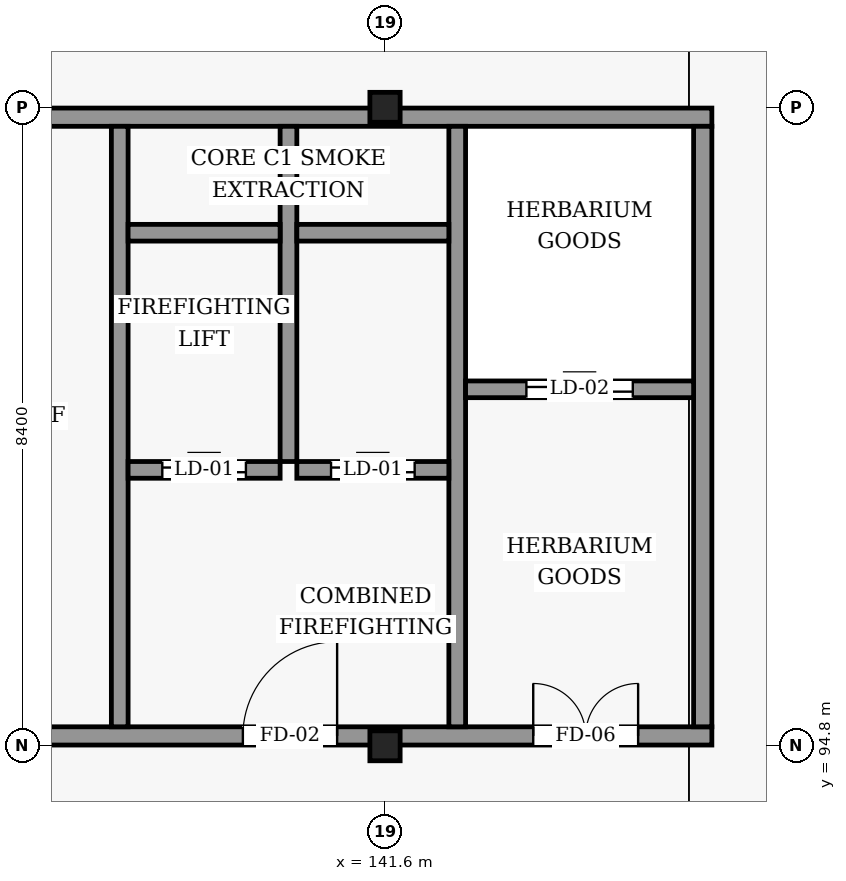
"""IFC4 building model, lengths in metres.
Left out: names, types, materials, properties, quantities, classifications, styles, units other than length and angle.
Written with IfcOpenShell. Run it as: python <this file> out.ifc"""

import sys

from ifc_helpers import new_model, si_unit, direction, frame, frame_2d, origin, origin_2d, place, context, subcontext, project, spatial, rectangle, i_section, extrude, element, fill, save


model = new_model("IFC4")
c1 = context("Model", 3, precision=1e-05, world=origin(), true_north=direction((0.0, 1.0)))
c2 = subcontext(c1, "Body", "Model", "MODEL_VIEW")
j1 = project(units=[si_unit("LENGTHUNIT", "METRE"), si_unit("PLANEANGLEUNIT", "RADIAN")], contexts=[c1])
p1 = place(None, origin())
s1 = spatial("IfcSite", under=j1, at=p1, CompositionType="ELEMENT")
p2 = place(p1, origin())
s2 = spatial("IfcBuilding", under=s1, at=p2, CompositionType="ELEMENT")
p3 = place(p2, frame((0.0, 0.0, 24.6)))
s3 = spatial("IfcBuildingStorey", under=s2, at=p3, CompositionType="ELEMENT", Elevation=24.6)
for number, where, z_axis, x_axis in (
    (1, (141.6, 94.8, 0.0), (0.0, 0.0, 1.0), (1.0, 0.0, 0.0)),
    (2, (141.6, 103.2, 0.0), (0.0, 0.0, 1.0), (1.0, 0.0, 0.0)),
):
    element("IfcColumn", number, at=place(p3, frame(where, z_axis=z_axis, x_axis=x_axis)), inside=s3, PredefinedType="COLUMN", context=c2, shape_type="SweptSolid", body=[
        extrude(i_section(OverallWidth=0.398, OverallDepth=0.394, WebThickness=0.011, FlangeThickness=0.018, FilletRadius=0.022, at=origin_2d()), origin(), (0.0, 0.0, 1.0), 3.6),
    ])
p4 = place(p3, frame((134.25, 94.93, 0.0), z_axis=(0.0, 0.0, 1.0), x_axis=(1.0, 0.0, 0.0)))
e3 = element("IfcWall", 3, at=p4, inside=s3, PredefinedType="SHEAR", context=c2, shape_type="SweptSolid", body=[
    extrude(rectangle(XDim=11.65, YDim=0.24, at=frame_2d((5.825, 0.0))), origin(), (0.0, 0.0, 1.0), 3.345),
])
p5 = place(p4, frame((1.5, 0.0, 0.0)))
e4 = element("IfcOpeningElement", 4, at=p5, cuts=e3, PredefinedType="OPENING", context=c2, shape_type="SweptSolid", body=[
    extrude(rectangle(XDim=1.22, YDim=2.18, at=frame_2d((0.61, 1.09))), frame((0.0, 0.13, 0.0), z_axis=(0.0, -1.0, 0.0), x_axis=(1.0, 0.0, 0.0)), (0.0, 0.0, 1.0), 0.26),
])
p6 = place(p4, frame((5.48, 0.0, 0.0)))
e5 = element("IfcOpeningElement", 5, at=p6, cuts=e3, PredefinedType="OPENING", context=c2, shape_type="SweptSolid", body=[
    extrude(rectangle(XDim=1.24, YDim=2.15, at=frame_2d((0.62, 1.075))), frame((0.0, 0.13, 0.0), z_axis=(0.0, -1.0, 0.0), x_axis=(1.0, 0.0, 0.0)), (0.0, 0.0, 1.0), 0.26),
])
p7 = place(p4, frame((9.3, 0.0, 0.0)))
e6 = element("IfcOpeningElement", 6, at=p7, cuts=e3, PredefinedType="OPENING", context=c2, shape_type="SweptSolid", body=[
    extrude(rectangle(XDim=1.38, YDim=2.15, at=frame_2d((0.69, 1.075))), frame((0.0, 0.13, 0.0), z_axis=(0.0, -1.0, 0.0), x_axis=(1.0, 0.0, 0.0)), (0.0, 0.0, 1.0), 0.26),
])
p8 = place(p3, frame((134.25, 103.07, 0.0), z_axis=(0.0, 0.0, 1.0), x_axis=(1.0, 0.0, 0.0)))
e7 = element("IfcWall", 7, at=p8, inside=s3, PredefinedType="SHEAR", context=c2, shape_type="SweptSolid", body=[
    extrude(rectangle(XDim=11.65, YDim=0.24, at=frame_2d((5.825, 0.0))), origin(), (0.0, 0.0, 1.0), 3.345),
])
p9 = place(p3, frame((138.11, 95.05, 0.0), z_axis=(0.0, 0.0, 1.0), x_axis=(0.0, 1.0, 0.0)))
e8 = element("IfcWall", 8, at=p9, inside=s3, PredefinedType="SHEAR", context=c2, shape_type="SweptSolid", body=[
    extrude(rectangle(XDim=7.9, YDim=0.22, at=frame_2d((3.95, 0.0))), origin(), (0.0, 0.0, 1.0), 3.345),
])
p10 = place(p3, frame((140.33, 98.54, 0.0), z_axis=(0.0, 0.0, 1.0), x_axis=(0.0, 1.0, 0.0)))
e9 = element("IfcWall", 9, at=p10, inside=s3, PredefinedType="SHEAR", context=c2, shape_type="SweptSolid", body=[
    extrude(rectangle(XDim=4.41, YDim=0.22, at=frame_2d((2.205, 0.0))), origin(), (0.0, 0.0, 1.0), 3.345),
])
p11 = place(p3, frame((142.55, 95.05, 0.0), z_axis=(0.0, 0.0, 1.0), x_axis=(0.0, 1.0, 0.0)))
e10 = element("IfcWall", 10, at=p11, inside=s3, PredefinedType="SHEAR", context=c2, shape_type="SweptSolid", body=[
    extrude(rectangle(XDim=7.9, YDim=0.22, at=frame_2d((3.95, 0.0))), origin(), (0.0, 0.0, 1.0), 3.345),
])
p12 = place(p3, frame((145.78, 95.05, 0.0), z_axis=(0.0, 0.0, 1.0), x_axis=(0.0, 1.0, 0.0)))
e11 = element("IfcWall", 11, at=p12, inside=s3, PredefinedType="SHEAR", context=c2, shape_type="SweptSolid", body=[
    extrude(rectangle(XDim=7.9, YDim=0.24, at=frame_2d((3.95, 0.0))), origin(), (0.0, 0.0, 1.0), 3.345),
])
p13 = place(p3, frame((138.22, 98.43, 0.0), z_axis=(0.0, 0.0, 1.0), x_axis=(1.0, 0.0, 0.0)))
e12 = element("IfcWall", 12, at=p13, inside=s3, PredefinedType="SHEAR", context=c2, shape_type="SweptSolid", body=[
    extrude(rectangle(XDim=2.0, YDim=0.22, at=frame_2d((1.0, 0.0))), origin(), (0.0, 0.0, 1.0), 3.345),
])
p14 = place(p13, frame((0.45, 0.0, 0.0)))
e13 = element("IfcOpeningElement", 13, at=p14, cuts=e12, PredefinedType="OPENING", context=c2, shape_type="SweptSolid", body=[
    extrude(rectangle(XDim=1.1, YDim=2.15, at=frame_2d((0.55, 1.075))), frame((0.0, 0.12, 0.0), z_axis=(0.0, -1.0, 0.0), x_axis=(1.0, 0.0, 0.0)), (0.0, 0.0, 1.0), 0.24),
])
p15 = place(p3, frame((140.44, 98.43, 0.0), z_axis=(0.0, 0.0, 1.0), x_axis=(1.0, 0.0, 0.0)))
e14 = element("IfcWall", 14, at=p15, inside=s3, PredefinedType="SHEAR", context=c2, shape_type="SweptSolid", body=[
    extrude(rectangle(XDim=2.0, YDim=0.22, at=frame_2d((1.0, 0.0))), origin(), (0.0, 0.0, 1.0), 3.345),
])
p16 = place(p15, frame((0.45, 0.0, 0.0)))
e15 = element("IfcOpeningElement", 15, at=p16, cuts=e14, PredefinedType="OPENING", context=c2, shape_type="SweptSolid", body=[
    extrude(rectangle(XDim=1.1, YDim=2.15, at=frame_2d((0.55, 1.075))), frame((0.0, 0.12, 0.0), z_axis=(0.0, -1.0, 0.0), x_axis=(1.0, 0.0, 0.0)), (0.0, 0.0, 1.0), 0.24),
])
for number, where, z_axis, x_axis in (
    (16, (138.22, 101.55, 0.0), (0.0, 0.0, 1.0), (1.0, 0.0, 0.0)),
    (17, (140.44, 101.55, 0.0), (0.0, 0.0, 1.0), (1.0, 0.0, 0.0)),
):
    element("IfcWall", number, at=place(p3, frame(where, z_axis=z_axis, x_axis=x_axis)), inside=s3, PredefinedType="SHEAR", context=c2, shape_type="SweptSolid", body=[
        extrude(rectangle(XDim=2.0, YDim=0.22, at=frame_2d((1.0, 0.0))), origin(), (0.0, 0.0, 1.0), 3.345),
    ])
p17 = place(p3, frame((142.66, 99.49, 0.0), z_axis=(0.0, 0.0, 1.0), x_axis=(1.0, 0.0, 0.0)))
e18 = element("IfcWall", 18, at=p17, inside=s3, PredefinedType="SHEAR", context=c2, shape_type="SweptSolid", body=[
    extrude(rectangle(XDim=3.0, YDim=0.22, at=frame_2d((1.5, 0.0))), origin(), (0.0, 0.0, 1.0), 3.345),
])
p18 = place(p17, frame((0.8, 0.0, 0.0)))
e19 = element("IfcOpeningElement", 19, at=p18, cuts=e18, PredefinedType="OPENING", context=c2, shape_type="SweptSolid", body=[
    extrude(rectangle(XDim=1.4, YDim=2.2, at=frame_2d((0.7, 1.1))), frame((0.0, 0.12, 0.0), z_axis=(0.0, -1.0, 0.0), x_axis=(1.0, 0.0, 0.0)), (0.0, 0.0, 1.0), 0.24),
])
p19 = place(p6, frame((1.24, 0.0, 0.0), z_axis=(0.0, 0.0, 1.0), x_axis=(-1.0, 0.0, 0.0)))
e20 = element("IfcDoor", 20, at=p19, inside=s3, OperationType="SINGLE_SWING_RIGHT", PredefinedType="DOOR", context=c2, shape_type="SweptSolid", body=[
    extrude(rectangle(XDim=1.24, YDim=2.15, at=frame_2d((0.62, 1.075))), frame((0.0, 0.025, 0.0), z_axis=(0.0, -1.0, 0.0), x_axis=(1.0, 0.0, 0.0)), (0.0, 0.0, 1.0), 0.05),
])
fill(e5, e20)
p20 = place(p7, frame((1.38, 0.0, 0.0), z_axis=(0.0, 0.0, 1.0), x_axis=(-1.0, 0.0, 0.0)))
e21 = element("IfcDoor", 21, at=p20, inside=s3, OperationType="DOUBLE_DOOR_SINGLE_SWING", PredefinedType="DOOR", context=c2, shape_type="SweptSolid", body=[
    extrude(rectangle(XDim=1.38, YDim=2.15, at=frame_2d((0.69, 1.075))), frame((0.0, 0.025, 0.0), z_axis=(0.0, -1.0, 0.0), x_axis=(1.0, 0.0, 0.0)), (0.0, 0.0, 1.0), 0.05),
])
fill(e6, e21)
p21 = place(p14, origin())
e22 = element("IfcDoor", 22, at=p21, inside=s3, OperationType="SLIDING_TO_LEFT", PredefinedType="DOOR", context=c2, shape_type="SweptSolid", body=[
    extrude(rectangle(XDim=1.1, YDim=2.15, at=frame_2d((0.55, 1.075))), frame((0.0, 0.025, 0.0), z_axis=(0.0, -1.0, 0.0), x_axis=(1.0, 0.0, 0.0)), (0.0, 0.0, 1.0), 0.05),
])
fill(e13, e22)
p22 = place(p16, origin())
e23 = element("IfcDoor", 23, at=p22, inside=s3, OperationType="SLIDING_TO_LEFT", PredefinedType="DOOR", context=c2, shape_type="SweptSolid", body=[
    extrude(rectangle(XDim=1.1, YDim=2.15, at=frame_2d((0.55, 1.075))), frame((0.0, 0.025, 0.0), z_axis=(0.0, -1.0, 0.0), x_axis=(1.0, 0.0, 0.0)), (0.0, 0.0, 1.0), 0.05),
])
fill(e15, e23)
p23 = place(p18, origin())
e24 = element("IfcDoor", 24, at=p23, inside=s3, OperationType="SLIDING_TO_LEFT", PredefinedType="DOOR", context=c2, shape_type="SweptSolid", body=[
    extrude(rectangle(XDim=1.4, YDim=2.2, at=frame_2d((0.7, 1.1))), frame((0.0, 0.025, 0.0), z_axis=(0.0, -1.0, 0.0), x_axis=(1.0, 0.0, 0.0)), (0.0, 0.0, 1.0), 0.05),
])
fill(e19, e24)
save(model, sys.argv[1])
